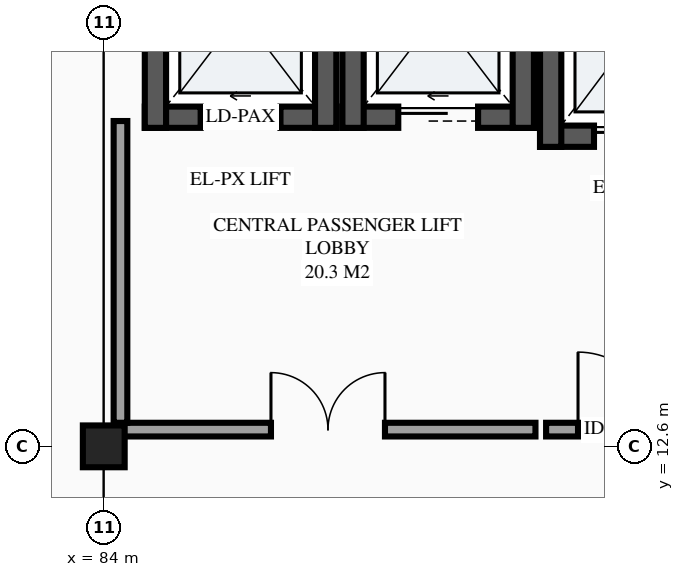
"""IFC4 building model, lengths in metres.
Left out: names, types, materials, properties, quantities, classifications, styles, units other than length and angle.
Written with IfcOpenShell. Run it as: python <this file> out.ifc"""

import sys

from ifc_helpers import new_model, si_unit, direction, frame, frame_2d, origin, origin_2d, place, context, subcontext, project, spatial, rectangle, extrude, element, fill, save


model = new_model("IFC4")
c1 = context("Model", 3, precision=1e-05, world=origin(), true_north=direction((0.0, 1.0)))
c2 = subcontext(c1, "Body", "Model", "MODEL_VIEW")
j1 = project(units=[si_unit("LENGTHUNIT", "METRE"), si_unit("PLANEANGLEUNIT", "RADIAN")], contexts=[c1])
p1 = place(None, origin())
s1 = spatial("IfcSite", under=j1, at=p1, CompositionType="ELEMENT")
p2 = place(p1, origin())
s2 = spatial("IfcBuilding", under=s1, at=p2, CompositionType="ELEMENT")
p3 = place(p2, frame((0.0, 0.0, 32.7)))
s3 = spatial("IfcBuildingStorey", under=s2, at=p3, CompositionType="ELEMENT", Elevation=32.7)
p4 = place(p3, frame((84.0, 12.6, 0.0), z_axis=(0.0, 0.0, 1.0), x_axis=(1.0, 0.0, 0.0)))
e1 = element("IfcColumn", 1, at=p4, inside=s3, PredefinedType="COLUMN", context=c2, shape_type="SweptSolid", body=[
    extrude(rectangle(XDim=0.55, YDim=0.55, at=origin_2d()), origin(), (0.0, 0.0, 1.0), 3.6),
])
p5 = place(p3, frame((84.54, 16.93, 0.0), z_axis=(0.0, 0.0, 1.0), x_axis=(1.0, 0.0, 0.0)))
e2 = element("IfcWall", 2, at=p5, inside=s3, PredefinedType="SHEAR", context=c2, shape_type="SweptSolid", body=[
    extrude(rectangle(XDim=2.52, YDim=0.28, at=frame_2d((1.26, 0.0))), origin(), (0.0, 0.0, 1.0), 3.6),
])
p6 = place(p5, frame((0.735, 0.0, 0.0)))
e3 = element("IfcOpeningElement", 3, at=p6, cuts=e2, PredefinedType="OPENING", context=c2, shape_type="SweptSolid", body=[
    extrude(rectangle(XDim=1.05, YDim=2.2, at=frame_2d((0.525, 1.1))), frame((0.0, 0.15, 0.0), z_axis=(0.0, -1.0, 0.0), x_axis=(1.0, 0.0, 0.0)), (0.0, 0.0, 1.0), 0.3),
])
for number, where, z_axis, x_axis in (
    (4, (86.92, 16.79, 0.0), (0.0, 0.0, 1.0), (0.0, 1.0, 0.0)),
    (5, (84.68, 19.81, 0.0), (0.0, 0.0, 1.0), (0.0, -1.0, 0.0)),
):
    element("IfcWall", number, at=place(p3, frame(where, z_axis=z_axis, x_axis=x_axis)), inside=s3, PredefinedType="SHEAR", context=c2, shape_type="SweptSolid", body=[
        extrude(rectangle(XDim=3.02, YDim=0.28, at=frame_2d((1.51, 0.0))), origin(), (0.0, 0.0, 1.0), 3.6),
    ])
p7 = place(p3, frame((87.14, 16.93, 0.0), z_axis=(0.0, 0.0, 1.0), x_axis=(1.0, 0.0, 0.0)))
e6 = element("IfcWall", 6, at=p7, inside=s3, PredefinedType="SHEAR", context=c2, shape_type="SweptSolid", body=[
    extrude(rectangle(XDim=2.52, YDim=0.28, at=frame_2d((1.26, 0.0))), origin(), (0.0, 0.0, 1.0), 3.6),
])
p8 = place(p7, frame((0.735, 0.0, 0.0)))
e7 = element("IfcOpeningElement", 7, at=p8, cuts=e6, PredefinedType="OPENING", context=c2, shape_type="SweptSolid", body=[
    extrude(rectangle(XDim=1.05, YDim=2.2, at=frame_2d((0.525, 1.1))), frame((0.0, 0.15, 0.0), z_axis=(0.0, -1.0, 0.0), x_axis=(1.0, 0.0, 0.0)), (0.0, 0.0, 1.0), 0.3),
])
for number, where, z_axis, x_axis in (
    (8, (89.52, 16.79, 0.0), (0.0, 0.0, 1.0), (0.0, 1.0, 0.0)),
    (9, (87.28, 19.81, 0.0), (0.0, 0.0, 1.0), (0.0, -1.0, 0.0)),
):
    element("IfcWall", number, at=place(p3, frame(where, z_axis=z_axis, x_axis=x_axis)), inside=s3, PredefinedType="SHEAR", context=c2, shape_type="SweptSolid", body=[
        extrude(rectangle(XDim=3.02, YDim=0.28, at=frame_2d((1.51, 0.0))), origin(), (0.0, 0.0, 1.0), 3.6),
    ])
p9 = place(p3, frame((89.74, 16.68, 0.0), z_axis=(0.0, 0.0, 1.0), x_axis=(1.0, 0.0, 0.0)))
e10 = element("IfcWall", 10, at=p9, inside=s3, PredefinedType="SHEAR", context=c2, shape_type="SweptSolid", body=[
    extrude(rectangle(XDim=2.72, YDim=0.28, at=frame_2d((1.36, 0.0))), origin(), (0.0, 0.0, 1.0), 3.6),
])
p10 = place(p9, frame((0.71, 0.0, 0.0)))
e11 = element("IfcOpeningElement", 11, at=p10, cuts=e10, PredefinedType="OPENING", context=c2, shape_type="SweptSolid", body=[
    extrude(rectangle(XDim=1.3, YDim=2.25, at=frame_2d((0.65, 1.125))), frame((0.0, 0.15, 0.0), z_axis=(0.0, -1.0, 0.0), x_axis=(1.0, 0.0, 0.0)), (0.0, 0.0, 1.0), 0.3),
])
p11 = place(p3, frame((89.88, 19.86, 0.0), z_axis=(0.0, 0.0, 1.0), x_axis=(0.0, -1.0, 0.0)))
e12 = element("IfcWall", 12, at=p11, inside=s3, PredefinedType="SHEAR", context=c2, shape_type="SweptSolid", body=[
    extrude(rectangle(XDim=3.32, YDim=0.28, at=frame_2d((1.66, 0.0))), origin(), (0.0, 0.0, 1.0), 3.6),
])
p12 = place(p3, frame((84.22, 12.82, 0.0), z_axis=(0.0, 0.0, 1.0), x_axis=(1.0, 0.0, 0.0)))
e13 = element("IfcWall", 13, at=p12, inside=s3, PredefinedType="PARTITIONING", context=c2, shape_type="SweptSolid", body=[
    extrude(rectangle(XDim=5.46, YDim=0.18, at=frame_2d((2.73, 0.0))), origin(), (0.0, 0.0, 1.0), 2.73),
])
p13 = place(p12, frame((1.98, 0.0, 0.0)))
e14 = element("IfcOpeningElement", 14, at=p13, cuts=e13, PredefinedType="OPENING", context=c2, shape_type="SweptSolid", body=[
    extrude(rectangle(XDim=1.5, YDim=2.15, at=frame_2d((0.75, 1.075))), frame((0.0, 0.1, 0.0), z_axis=(0.0, -1.0, 0.0), x_axis=(1.0, 0.0, 0.0)), (0.0, 0.0, 1.0), 0.2),
])
p14 = place(p3, frame((84.22, 12.91, 0.0), z_axis=(0.0, 0.0, 1.0), x_axis=(0.0, 1.0, 0.0)))
e15 = element("IfcWall", 15, at=p14, inside=s3, PredefinedType="PARTITIONING", context=c2, shape_type="SweptSolid", body=[
    extrude(rectangle(XDim=3.97, YDim=0.18, at=frame_2d((1.985, 0.0))), origin(), (0.0, 0.0, 1.0), 2.53),
])
p15 = place(p3, frame((89.82, 12.82, 0.0), z_axis=(0.0, 0.0, 1.0), x_axis=(1.0, 0.0, 0.0)))
e16 = element("IfcWall", 16, at=p15, inside=s3, PredefinedType="PARTITIONING", context=c2, shape_type="SweptSolid", body=[
    extrude(rectangle(XDim=2.305, YDim=0.18, at=frame_2d((1.152, 0.0))), origin(), (0.0, 0.0, 1.0), 2.73),
])
p16 = place(p15, frame((0.42, 0.0, 0.0)))
e17 = element("IfcOpeningElement", 17, at=p16, cuts=e16, PredefinedType="OPENING", context=c2, shape_type="SweptSolid", body=[
    extrude(rectangle(XDim=1.02, YDim=2.15, at=frame_2d((0.51, 1.075))), frame((0.0, 0.1, 0.0), z_axis=(0.0, -1.0, 0.0), x_axis=(1.0, 0.0, 0.0)), (0.0, 0.0, 1.0), 0.2),
])
p17 = place(p6, origin())
e18 = element("IfcDoor", 18, at=p17, inside=s3, OperationType="SLIDING_TO_LEFT", PredefinedType="DOOR", context=c2, shape_type="SweptSolid", body=[
    extrude(rectangle(XDim=1.05, YDim=2.2, at=frame_2d((0.525, 1.1))), frame((0.0, 0.025, 0.0), z_axis=(0.0, -1.0, 0.0), x_axis=(1.0, 0.0, 0.0)), (0.0, 0.0, 1.0), 0.05),
])
fill(e3, e18)
p18 = place(p8, origin())
e19 = element("IfcDoor", 19, at=p18, inside=s3, OperationType="SLIDING_TO_LEFT", PredefinedType="DOOR", context=c2, shape_type="SweptSolid", body=[
    extrude(rectangle(XDim=1.05, YDim=2.2, at=frame_2d((0.525, 1.1))), frame((0.0, 0.025, 0.0), z_axis=(0.0, -1.0, 0.0), x_axis=(1.0, 0.0, 0.0)), (0.0, 0.0, 1.0), 0.05),
])
fill(e7, e19)
p19 = place(p10, origin())
e20 = element("IfcDoor", 20, at=p19, inside=s3, OperationType="SLIDING_TO_LEFT", PredefinedType="DOOR", context=c2, shape_type="SweptSolid", body=[
    extrude(rectangle(XDim=1.3, YDim=2.25, at=frame_2d((0.65, 1.125))), frame((0.0, 0.025, 0.0), z_axis=(0.0, -1.0, 0.0), x_axis=(1.0, 0.0, 0.0)), (0.0, 0.0, 1.0), 0.05),
])
fill(e11, e20)
p20 = place(p13, origin())
e21 = element("IfcDoor", 21, at=p20, inside=s3, OperationType="DOUBLE_DOOR_SINGLE_SWING", PredefinedType="DOOR", context=c2, shape_type="SweptSolid", body=[
    extrude(rectangle(XDim=1.5, YDim=2.15, at=frame_2d((0.75, 1.075))), frame((0.0, 0.025, 0.0), z_axis=(0.0, -1.0, 0.0), x_axis=(1.0, 0.0, 0.0)), (0.0, 0.0, 1.0), 0.05),
])
fill(e14, e21)
p21 = place(p16, origin())
e22 = element("IfcDoor", 22, at=p21, inside=s3, OperationType="SINGLE_SWING_LEFT", PredefinedType="DOOR", context=c2, shape_type="SweptSolid", body=[
    extrude(rectangle(XDim=1.02, YDim=2.15, at=frame_2d((0.51, 1.075))), frame((0.0, 0.025, 0.0), z_axis=(0.0, -1.0, 0.0), x_axis=(1.0, 0.0, 0.0)), (0.0, 0.0, 1.0), 0.05),
])
fill(e17, e22)
save(model, sys.argv[1])
